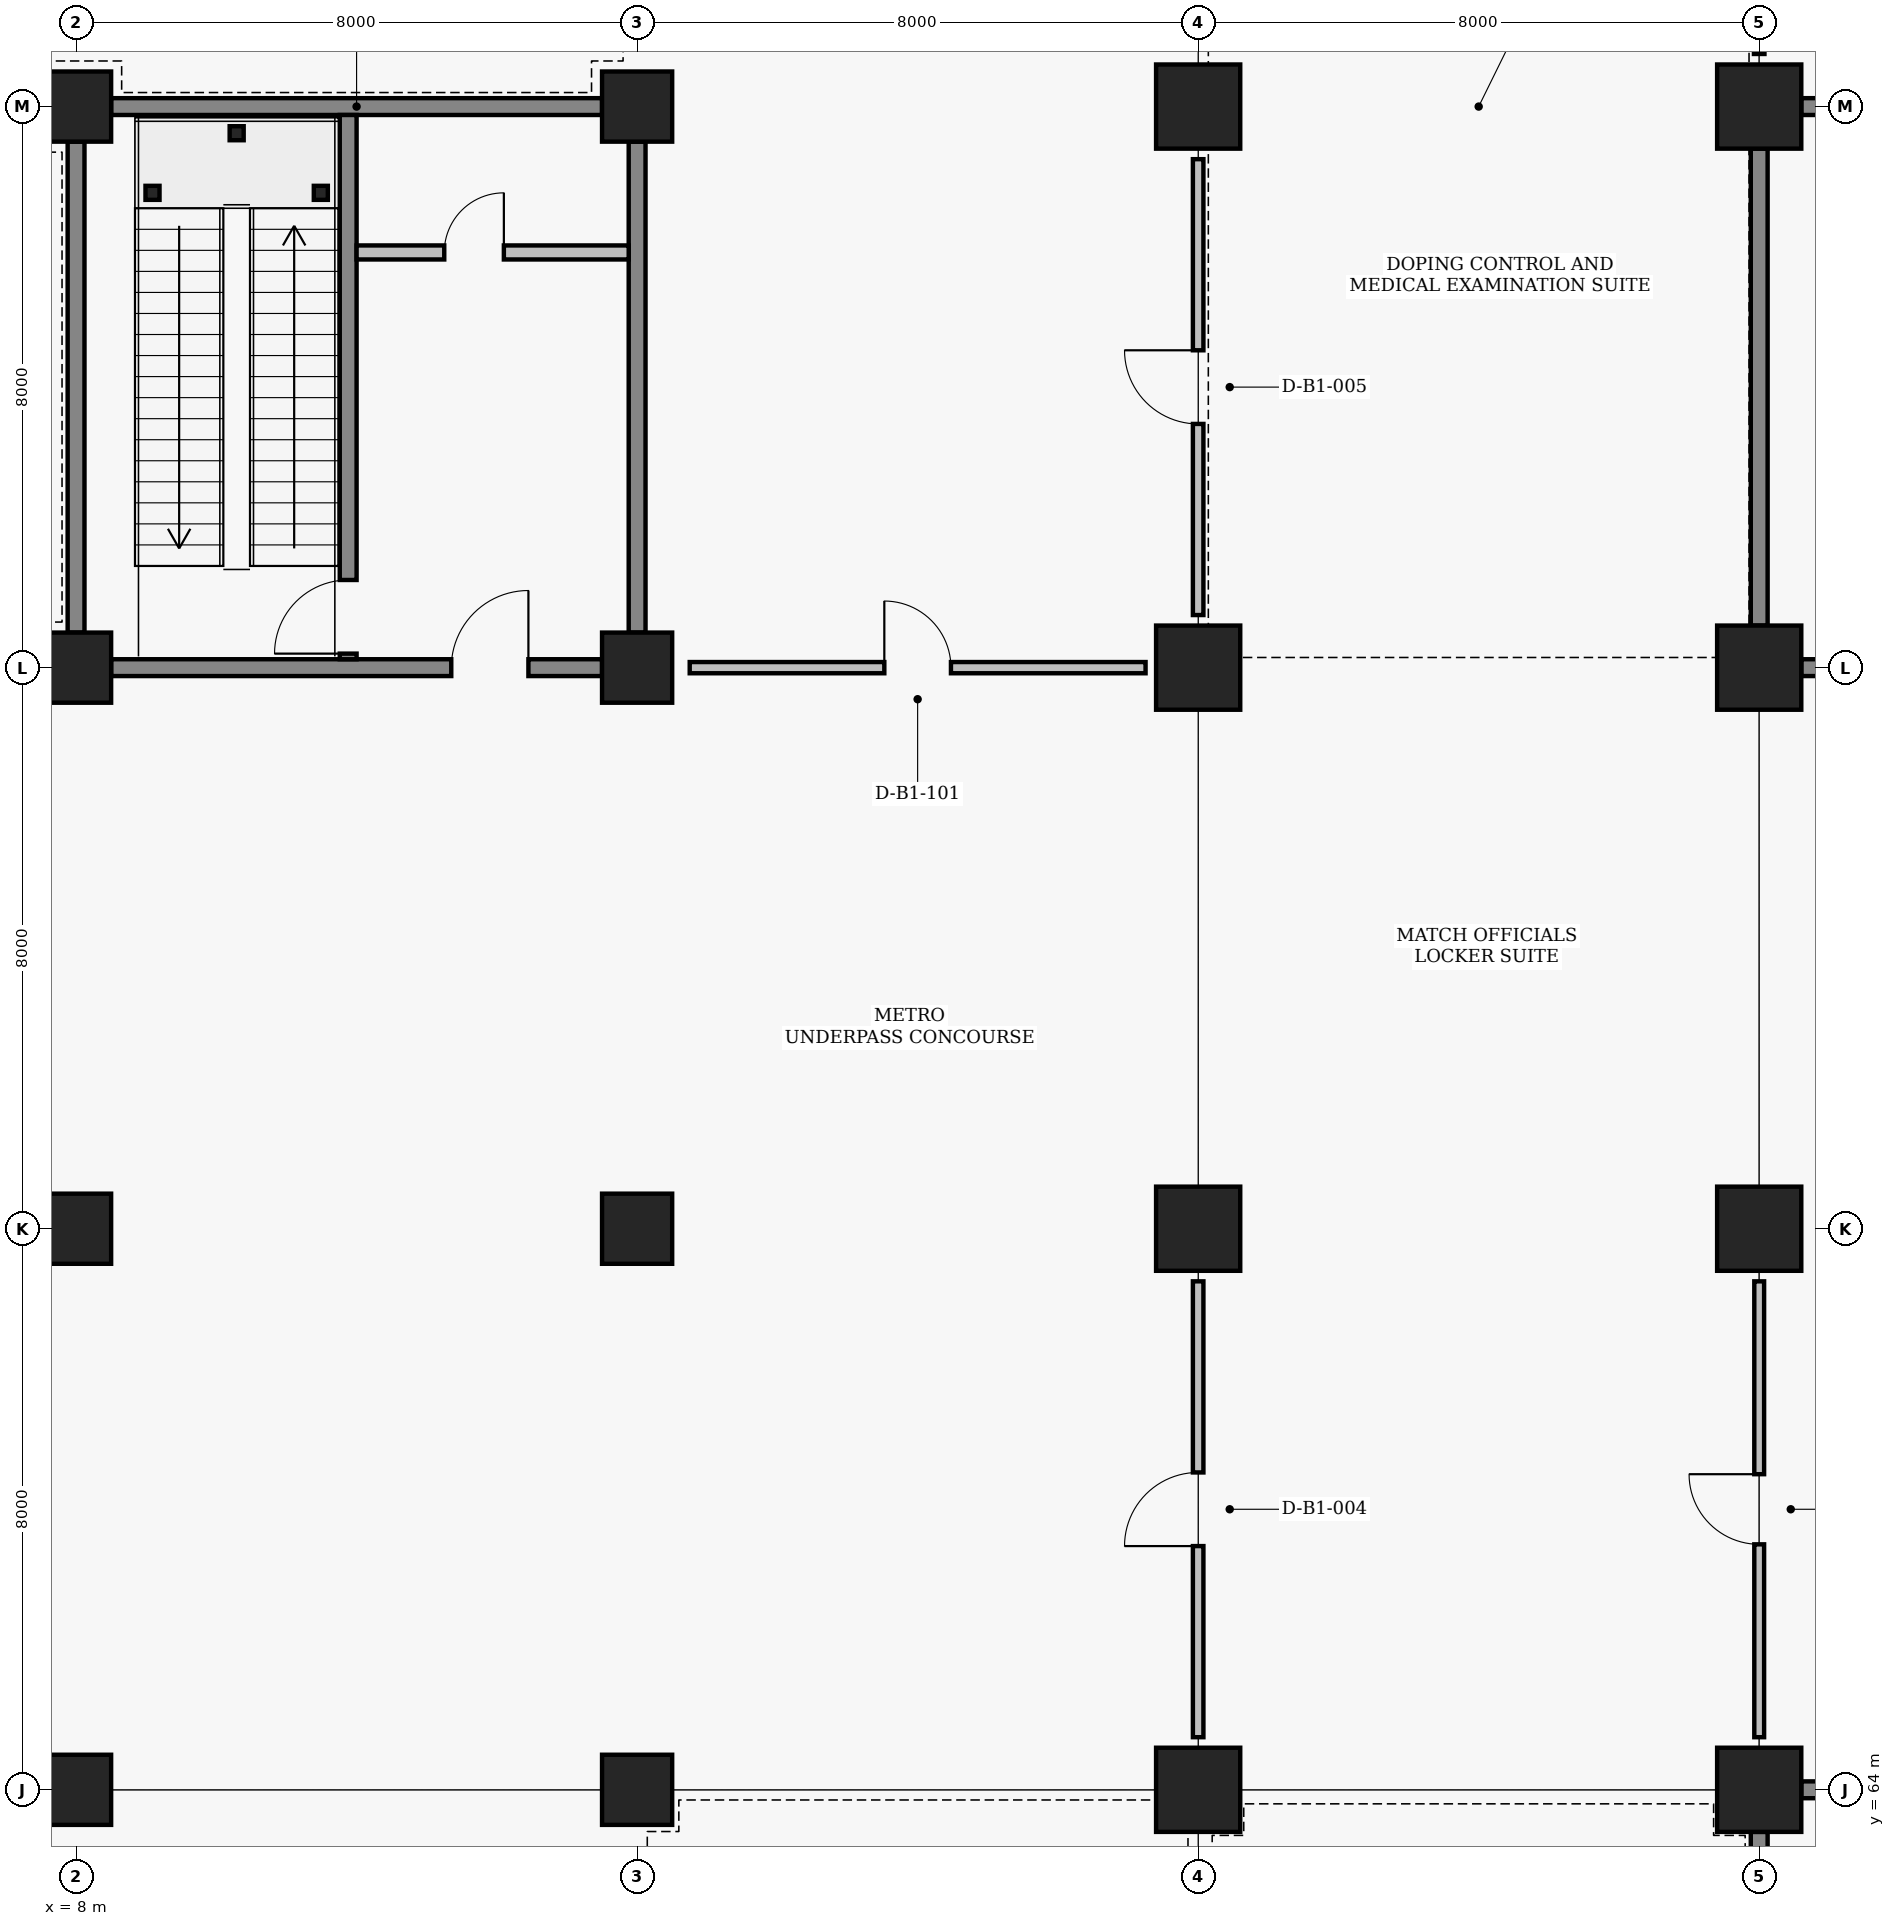
"""IFC4 building model, lengths in metres.
Left out: names, types, materials, properties, quantities, classifications, styles, units other than length and angle.
Written with IfcOpenShell. Run it as: python <this file> out.ifc"""

import sys

from ifc_helpers import new_model, si_unit, direction, frame, frame_2d, origin, origin_2d, place, context, subcontext, project, spatial, rectangle, hollow_rectangle, circle, extrude, element, fill, save


model = new_model("IFC4")
c1 = context("Model", 3, precision=1e-05, world=origin(), true_north=direction((0.0, 1.0)))
c2 = subcontext(c1, "Body", "Model", "MODEL_VIEW")
j1 = project(units=[si_unit("LENGTHUNIT", "METRE"), si_unit("PLANEANGLEUNIT", "RADIAN")], contexts=[c1])
p1 = place(None, origin())
s1 = spatial("IfcSite", under=j1, at=p1, CompositionType="ELEMENT")
p2 = place(p1, origin())
s2 = spatial("IfcBuilding", under=s1, at=p2, CompositionType="ELEMENT")
p3 = place(p2, frame((0.0, 0.0, -5.4)))
s3 = spatial("IfcBuildingStorey", under=s2, at=p3, CompositionType="ELEMENT", Elevation=-5.4)
for number, where, z_axis, x_axis in (
    (1, (8.0, 64.0, 0.0), (0.0, 0.0, 1.0), (1.0, 0.0, 0.0)),
    (2, (8.0, 72.0, 0.0), (0.0, 0.0, 1.0), (1.0, 0.0, 0.0)),
    (3, (8.0, 80.0, 0.0), (0.0, 0.0, 1.0), (1.0, 0.0, 0.0)),
    (4, (8.0, 88.0, 0.0), (0.0, 0.0, 1.0), (1.0, 0.0, 0.0)),
    (5, (16.0, 64.0, 0.0), (0.0, 0.0, 1.0), (1.0, 0.0, 0.0)),
    (6, (16.0, 72.0, 0.0), (0.0, 0.0, 1.0), (1.0, 0.0, 0.0)),
    (7, (16.0, 80.0, 0.0), (0.0, 0.0, 1.0), (1.0, 0.0, 0.0)),
    (8, (16.0, 88.0, 0.0), (0.0, 0.0, 1.0), (1.0, 0.0, 0.0)),
):
    element("IfcColumn", number, at=place(p3, frame(where, z_axis=z_axis, x_axis=x_axis)), inside=s3, PredefinedType="COLUMN", context=c2, shape_type="SweptSolid", body=[
        extrude(circle(Radius=0.5, at=origin_2d()), origin(), (0.0, 0.0, 1.0), 5.4),
    ])
for number, where, z_axis, x_axis in (
    (9, (24.0, 64.0, 0.0), (0.0, 0.0, 1.0), (1.0, 0.0, 0.0)),
    (10, (24.0, 72.0, 0.0), (0.0, 0.0, 1.0), (1.0, 0.0, 0.0)),
    (11, (24.0, 80.0, 0.0), (0.0, 0.0, 1.0), (1.0, 0.0, 0.0)),
    (12, (24.0, 88.0, 0.0), (0.0, 0.0, 1.0), (1.0, 0.0, 0.0)),
    (13, (32.0, 64.0, 0.0), (0.0, 0.0, 1.0), (1.0, 0.0, 0.0)),
    (14, (32.0, 72.0, 0.0), (0.0, 0.0, 1.0), (1.0, 0.0, 0.0)),
    (15, (32.0, 80.0, 0.0), (0.0, 0.0, 1.0), (1.0, 0.0, 0.0)),
    (16, (32.0, 88.0, 0.0), (0.0, 0.0, 1.0), (1.0, 0.0, 0.0)),
):
    element("IfcColumn", number, at=place(p3, frame(where, z_axis=z_axis, x_axis=x_axis)), inside=s3, PredefinedType="COLUMN", context=c2, shape_type="SweptSolid", body=[
        extrude(rectangle(XDim=1.2, YDim=1.2, at=origin_2d()), origin(), (0.0, 0.0, 1.0), 5.4),
    ])
p4 = place(p3, frame((32.6, 64.0, 0.0), z_axis=(0.0, 0.0, 1.0), x_axis=(1.0, 0.0, 0.0)))
e17 = element("IfcWall", 17, at=p4, inside=s3, PredefinedType="SHEAR", context=c2, shape_type="SweptSolid", body=[
    extrude(rectangle(XDim=6.8, YDim=0.24, at=frame_2d((3.4, 0.0))), origin(), (0.0, 0.0, 1.0), 4.59),
])
p5 = place(p3, frame((32.0, 56.6, 0.0), z_axis=(0.0, 0.0, 1.0), x_axis=(0.0, 1.0, 0.0)))
e18 = element("IfcWall", 18, at=p5, inside=s3, PredefinedType="SHEAR", context=c2, shape_type="SweptSolid", body=[
    extrude(rectangle(XDim=6.8, YDim=0.24, at=frame_2d((3.4, 0.0))), origin(), (0.0, 0.0, 1.0), 4.39),
])
p6 = place(p3, frame((32.6, 80.0, 0.0), z_axis=(0.0, 0.0, 1.0), x_axis=(1.0, 0.0, 0.0)))
e19 = element("IfcWall", 19, at=p6, inside=s3, PredefinedType="SHEAR", context=c2, shape_type="SweptSolid", body=[
    extrude(rectangle(XDim=6.8, YDim=0.24, at=frame_2d((3.4, 0.0))), origin(), (0.0, 0.0, 1.0), 4.59),
])
p7 = place(p6, frame((4.65, 0.0, 0.0)))
e20 = element("IfcOpeningElement", 20, at=p7, cuts=e19, PredefinedType="OPENING", context=c2, shape_type="SweptSolid", body=[
    extrude(rectangle(XDim=1.1, YDim=2.2, at=frame_2d((0.55, 1.1))), frame((0.0, 0.13, 0.0), z_axis=(0.0, -1.0, 0.0), x_axis=(1.0, 0.0, 0.0)), (0.0, 0.0, 1.0), 0.26),
])
for number, where, z_axis, x_axis in (
    (21, (32.6, 88.0, 0.0), (0.0, 0.0, 1.0), (1.0, 0.0, 0.0)),
    (22, (32.0, 80.6, 0.0), (0.0, 0.0, 1.0), (0.0, 1.0, 0.0)),
):
    element("IfcWall", number, at=place(p3, frame(where, z_axis=z_axis, x_axis=x_axis)), inside=s3, PredefinedType="SHEAR", context=c2, shape_type="SweptSolid", body=[
        extrude(rectangle(XDim=6.8, YDim=0.24, at=frame_2d((3.4, 0.0))), origin(), (0.0, 0.0, 1.0), 3.69),
    ])
p8 = place(p3, frame((8.5, 80.0, 0.0), z_axis=(0.0, 0.0, 1.0), x_axis=(1.0, 0.0, 0.0)))
e23 = element("IfcWall", 23, at=p8, inside=s3, PredefinedType="SHEAR", context=c2, shape_type="SweptSolid", body=[
    extrude(rectangle(XDim=7.0, YDim=0.24, at=frame_2d((3.5, 0.0))), origin(), (0.0, 0.0, 1.0), 4.39),
])
p9 = place(p8, frame((4.85, 0.0, 0.0)))
e24 = element("IfcOpeningElement", 24, at=p9, cuts=e23, PredefinedType="OPENING", context=c2, shape_type="SweptSolid", body=[
    extrude(rectangle(XDim=1.1, YDim=2.2, at=frame_2d((0.55, 1.1))), frame((0.0, 0.13, 0.0), z_axis=(0.0, -1.0, 0.0), x_axis=(1.0, 0.0, 0.0)), (0.0, 0.0, 1.0), 0.26),
])
for number, where, z_axis, x_axis in (
    (25, (8.5, 88.0, 0.0), (0.0, 0.0, 1.0), (1.0, 0.0, 0.0)),
    (26, (8.0, 80.5, 0.0), (0.0, 0.0, 1.0), (0.0, 1.0, 0.0)),
    (27, (16.0, 80.5, 0.0), (0.0, 0.0, 1.0), (0.0, 1.0, 0.0)),
):
    element("IfcWall", number, at=place(p3, frame(where, z_axis=z_axis, x_axis=x_axis)), inside=s3, PredefinedType="SHEAR", context=c2, shape_type="SweptSolid", body=[
        extrude(rectangle(XDim=7.0, YDim=0.24, at=frame_2d((3.5, 0.0))), origin(), (0.0, 0.0, 1.0), 4.39),
    ])
p10 = place(p3, frame((11.88, 80.12, 0.0), z_axis=(0.0, 0.0, 1.0), x_axis=(0.0, 1.0, 0.0)))
e28 = element("IfcWall", 28, at=p10, inside=s3, PredefinedType="SHEAR", context=c2, shape_type="SweptSolid", body=[
    extrude(rectangle(XDim=7.76, YDim=0.24, at=frame_2d((3.88, 0.0))), origin(), (0.0, 0.0, 1.0), 4.59),
])
p11 = place(p10, frame((0.08, 0.0, 0.0)))
e29 = element("IfcOpeningElement", 29, at=p11, cuts=e28, PredefinedType="OPENING", context=c2, shape_type="SweptSolid", body=[
    extrude(rectangle(XDim=1.05, YDim=2.15, at=frame_2d((0.525, 1.075))), frame((0.0, 0.13, 0.0), z_axis=(0.0, -1.0, 0.0), x_axis=(1.0, 0.0, 0.0)), (0.0, 0.0, 1.0), 0.26),
])
p12 = place(p3, frame((12.0, 85.92, 0.0), z_axis=(0.0, 0.0, 1.0), x_axis=(1.0, 0.0, 0.0)))
e30 = element("IfcWall", 30, at=p12, inside=s3, PredefinedType="PARTITIONING", context=c2, shape_type="SweptSolid", body=[
    extrude(rectangle(XDim=3.88, YDim=0.2, at=frame_2d((1.94, 0.0))), origin(), (0.0, 0.0, 1.0), 4.39),
])
p13 = place(p12, frame((1.25, 0.0, 0.0)))
e31 = element("IfcOpeningElement", 31, at=p13, cuts=e30, PredefinedType="OPENING", context=c2, shape_type="SweptSolid", body=[
    extrude(rectangle(XDim=0.85, YDim=2.05, at=frame_2d((0.425, 1.025))), frame((0.0, 0.11, 0.0), z_axis=(0.0, -1.0, 0.0), x_axis=(1.0, 0.0, 0.0)), (0.0, 0.0, 1.0), 0.22),
])
for number, where, z_axis, x_axis in (
    (32, (9.09, 86.77, 0.0), (0.0, 0.0, 1.0), (1.0, 0.0, 0.0)),
    (33, (11.49, 86.77, 0.0), (0.0, 0.0, 1.0), (1.0, 0.0, 0.0)),
    (34, (10.29, 87.62, 0.0), (0.0, 0.0, 1.0), (1.0, 0.0, 0.0)),
):
    element("IfcColumn", number, at=place(p3, frame(where, z_axis=z_axis, x_axis=x_axis)), inside=s3, PredefinedType="COLUMN", context=c2, shape_type="SweptSolid", body=[
        extrude(hollow_rectangle(XDim=0.2, YDim=0.2, WallThickness=0.009, at=origin_2d()), origin(), (0.0, 0.0, 1.0), 2.5),
    ])
p14 = place(p3, frame((24.0, 64.75, 0.0), z_axis=(0.0, 0.0, 1.0), x_axis=(0.0, 1.0, 0.0)))
e35 = element("IfcWall", 35, at=p14, inside=s3, PredefinedType="PARTITIONING", context=c2, shape_type="SweptSolid", body=[
    extrude(rectangle(XDim=6.5, YDim=0.15, at=frame_2d((3.25, 0.0))), origin(), (0.0, 0.0, 1.0), 4.39),
])
p15 = place(p14, frame((2.725, 0.0, 0.0)))
e36 = element("IfcOpeningElement", 36, at=p15, cuts=e35, PredefinedType="OPENING", context=c2, shape_type="SweptSolid", body=[
    extrude(rectangle(XDim=1.05, YDim=2.15, at=frame_2d((0.525, 1.075))), frame((0.0, 0.085, 0.0), z_axis=(0.0, -1.0, 0.0), x_axis=(1.0, 0.0, 0.0)), (0.0, 0.0, 1.0), 0.17),
])
p16 = place(p3, frame((24.0, 80.75, 0.0), z_axis=(0.0, 0.0, 1.0), x_axis=(0.0, 1.0, 0.0)))
e37 = element("IfcWall", 37, at=p16, inside=s3, PredefinedType="PARTITIONING", context=c2, shape_type="SweptSolid", body=[
    extrude(rectangle(XDim=6.5, YDim=0.15, at=frame_2d((3.25, 0.0))), origin(), (0.0, 0.0, 1.0), 3.69),
])
p17 = place(p16, frame((2.725, 0.0, 0.0)))
e38 = element("IfcOpeningElement", 38, at=p17, cuts=e37, PredefinedType="OPENING", context=c2, shape_type="SweptSolid", body=[
    extrude(rectangle(XDim=1.05, YDim=2.15, at=frame_2d((0.525, 1.075))), frame((0.0, 0.085, 0.0), z_axis=(0.0, -1.0, 0.0), x_axis=(1.0, 0.0, 0.0)), (0.0, 0.0, 1.0), 0.17),
])
p18 = place(p3, frame((32.0, 64.75, 0.0), z_axis=(0.0, 0.0, 1.0), x_axis=(0.0, 1.0, 0.0)))
e39 = element("IfcWall", 39, at=p18, inside=s3, PredefinedType="MOVABLE", context=c2, shape_type="SweptSolid", body=[
    extrude(rectangle(XDim=6.5, YDim=0.14, at=frame_2d((3.25, 0.0))), origin(), (0.0, 0.0, 1.0), 4.39),
])
p19 = place(p18, frame((2.75, 0.0, 0.0)))
e40 = element("IfcOpeningElement", 40, at=p19, cuts=e39, PredefinedType="OPENING", context=c2, shape_type="SweptSolid", body=[
    extrude(rectangle(XDim=1.0, YDim=2.1, at=frame_2d((0.5, 1.05))), frame((0.0, 0.08, 0.0), z_axis=(0.0, -1.0, 0.0), x_axis=(1.0, 0.0, 0.0)), (0.0, 0.0, 1.0), 0.16),
])
p20 = place(p3, frame((32.0, 88.75, 0.0), z_axis=(0.0, 0.0, 1.0), x_axis=(0.0, 1.0, 0.0)))
e41 = element("IfcWall", 41, at=p20, inside=s3, PredefinedType="PARTITIONING", context=c2, shape_type="SweptSolid", body=[
    extrude(rectangle(XDim=6.5, YDim=0.15, at=frame_2d((3.25, 0.0))), origin(), (0.0, 0.0, 1.0), 3.69),
])
p21 = place(p20, frame((2.35, 0.0, 0.0)))
e42 = element("IfcOpeningElement", 42, at=p21, cuts=e41, PredefinedType="OPENING", context=c2, shape_type="SweptSolid", body=[
    extrude(rectangle(XDim=1.8, YDim=2.3, at=frame_2d((0.9, 1.15))), frame((0.0, 0.085, 0.0), z_axis=(0.0, -1.0, 0.0), x_axis=(1.0, 0.0, 0.0)), (0.0, 0.0, 1.0), 0.17),
])
p22 = place(p3, frame((16.75, 80.0, 0.0), z_axis=(0.0, 0.0, 1.0), x_axis=(1.0, 0.0, 0.0)))
e43 = element("IfcWall", 43, at=p22, inside=s3, PredefinedType="PARTITIONING", context=c2, shape_type="SweptSolid", body=[
    extrude(rectangle(XDim=6.5, YDim=0.16, at=frame_2d((3.25, 0.0))), origin(), (0.0, 0.0, 1.0), 4.49),
])
p23 = place(p22, frame((2.775, 0.0, 0.0)))
e44 = element("IfcOpeningElement", 44, at=p23, cuts=e43, PredefinedType="OPENING", context=c2, shape_type="SweptSolid", body=[
    extrude(rectangle(XDim=0.95, YDim=2.1, at=frame_2d((0.475, 1.05))), frame((0.0, 0.09, 0.0), z_axis=(0.0, -1.0, 0.0), x_axis=(1.0, 0.0, 0.0)), (0.0, 0.0, 1.0), 0.18),
])
p24 = place(p9, origin())
e45 = element("IfcDoor", 45, at=p24, inside=s3, OperationType="SINGLE_SWING_RIGHT", PredefinedType="DOOR", context=c2, shape_type="SweptSolid", body=[
    extrude(rectangle(XDim=1.1, YDim=2.2, at=frame_2d((0.55, 1.1))), frame((0.0, 0.025, 0.0), z_axis=(0.0, -1.0, 0.0), x_axis=(1.0, 0.0, 0.0)), (0.0, 0.0, 1.0), 0.05),
])
fill(e24, e45)
p25 = place(p11, origin())
e46 = element("IfcDoor", 46, at=p25, inside=s3, OperationType="SINGLE_SWING_LEFT", PredefinedType="DOOR", context=c2, shape_type="SweptSolid", body=[
    extrude(rectangle(XDim=1.05, YDim=2.15, at=frame_2d((0.525, 1.075))), frame((0.0, 0.025, 0.0), z_axis=(0.0, -1.0, 0.0), x_axis=(1.0, 0.0, 0.0)), (0.0, 0.0, 1.0), 0.05),
])
fill(e29, e46)
p26 = place(p13, origin())
e47 = element("IfcDoor", 47, at=p26, inside=s3, OperationType="SINGLE_SWING_RIGHT", PredefinedType="TRAPDOOR", context=c2, shape_type="SweptSolid", body=[
    extrude(rectangle(XDim=0.85, YDim=2.05, at=frame_2d((0.425, 1.025))), frame((0.0, 0.025, 0.0), z_axis=(0.0, -1.0, 0.0), x_axis=(1.0, 0.0, 0.0)), (0.0, 0.0, 1.0), 0.05),
])
fill(e31, e47)
p27 = place(p15, origin())
e48 = element("IfcDoor", 48, at=p27, inside=s3, OperationType="SINGLE_SWING_LEFT", PredefinedType="DOOR", context=c2, shape_type="SweptSolid", body=[
    extrude(rectangle(XDim=1.05, YDim=2.15, at=frame_2d((0.525, 1.075))), frame((0.0, 0.025, 0.0), z_axis=(0.0, -1.0, 0.0), x_axis=(1.0, 0.0, 0.0)), (0.0, 0.0, 1.0), 0.05),
])
fill(e36, e48)
p28 = place(p17, origin())
e49 = element("IfcDoor", 49, at=p28, inside=s3, OperationType="SINGLE_SWING_RIGHT", PredefinedType="DOOR", context=c2, shape_type="SweptSolid", body=[
    extrude(rectangle(XDim=1.05, YDim=2.15, at=frame_2d((0.525, 1.075))), frame((0.0, 0.025, 0.0), z_axis=(0.0, -1.0, 0.0), x_axis=(1.0, 0.0, 0.0)), (0.0, 0.0, 1.0), 0.05),
])
fill(e38, e49)
p29 = place(p19, origin())
e50 = element("IfcDoor", 50, at=p29, inside=s3, OperationType="SINGLE_SWING_RIGHT", PredefinedType="DOOR", context=c2, shape_type="SweptSolid", body=[
    extrude(rectangle(XDim=1.0, YDim=2.1, at=frame_2d((0.5, 1.05))), frame((0.0, 0.025, 0.0), z_axis=(0.0, -1.0, 0.0), x_axis=(1.0, 0.0, 0.0)), (0.0, 0.0, 1.0), 0.05),
])
fill(e40, e50)
p30 = place(p23, origin())
e51 = element("IfcDoor", 51, at=p30, inside=s3, OperationType="SINGLE_SWING_LEFT", PredefinedType="DOOR", context=c2, shape_type="SweptSolid", body=[
    extrude(rectangle(XDim=0.95, YDim=2.1, at=frame_2d((0.475, 1.05))), frame((0.0, 0.025, 0.0), z_axis=(0.0, -1.0, 0.0), x_axis=(1.0, 0.0, 0.0)), (0.0, 0.0, 1.0), 0.05),
])
fill(e44, e51)
save(model, sys.argv[1])
